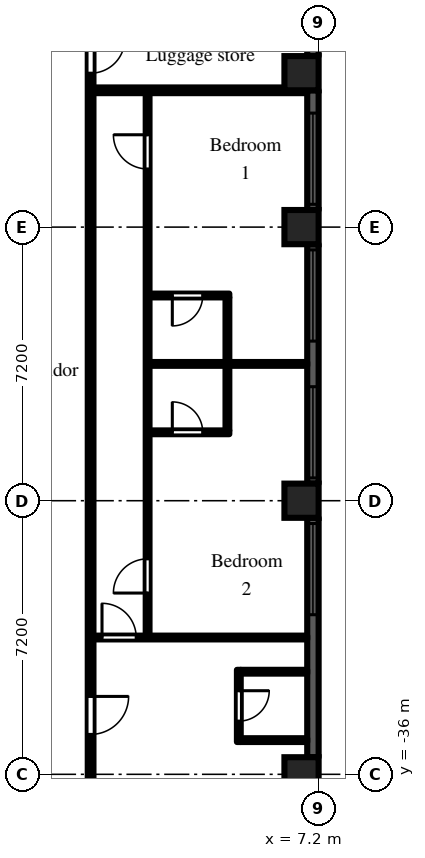
"""IFC4 building model, lengths in metres.
Left out: names, types, materials, properties, quantities, classifications, styles, units other than length and angle.
Written with IfcOpenShell. Run it as: python <this file> out.ifc"""

import sys

from ifc_helpers import new_model, si_unit, direction, frame, frame_2d, origin, origin_2d, place, context, subcontext, project, spatial, rectangle, extrude, element, fill, save


model = new_model("IFC4")
c1 = context("Model", 3, precision=1e-05, world=origin(), true_north=direction((0.0, 1.0)))
c2 = subcontext(c1, "Body", "Model", "MODEL_VIEW")
j1 = project(units=[si_unit("LENGTHUNIT", "METRE"), si_unit("PLANEANGLEUNIT", "RADIAN")], contexts=[c1])
p1 = place(None, origin())
s1 = spatial("IfcSite", under=j1, at=p1, CompositionType="ELEMENT")
p2 = place(p1, origin())
s2 = spatial("IfcBuilding", under=s1, at=p2, CompositionType="ELEMENT")
p3 = place(p2, frame((0.0, 0.0, 108.9)))
s3 = spatial("IfcBuildingStorey", under=s2, at=p3, CompositionType="ELEMENT", Elevation=108.9)
for number, where, z_axis, x_axis in (
    (1, (6.75, -36.0, 0.0), (0.0, 0.0, 1.0), (1.0, 0.0, 0.0)),
    (2, (6.75, -28.8, 0.0), (0.0, 0.0, 1.0), (1.0, 0.0, 0.0)),
    (3, (6.75, -21.6, 0.0), (0.0, 0.0, 1.0), (1.0, 0.0, 0.0)),
    (4, (6.75, -17.55, 0.0), (0.0, 0.0, 1.0), (1.0, 0.0, 0.0)),
):
    element("IfcColumn", number, at=place(p3, frame(where, z_axis=z_axis, x_axis=x_axis)), inside=s3, PredefinedType="COLUMN", context=c2, shape_type="SweptSolid", body=[
        extrude(rectangle(XDim=0.9, YDim=0.9, at=origin_2d()), origin(), (0.0, 0.0, 1.0), 3.0),
    ])
p4 = place(p3, frame((7.05, -35.55, 0.0), z_axis=(0.0, 0.0, 1.0), x_axis=(0.0, 1.0, 0.0)))
e5 = element("IfcWall", 5, at=p4, inside=s3, PredefinedType="SOLIDWALL", context=c2, shape_type="SweptSolid", body=[
    extrude(rectangle(XDim=6.3, YDim=0.3, at=frame_2d((3.15, 0.0))), origin(), (0.0, 0.0, 1.0), 2.2),
])
p5 = place(p4, frame((3.75, 0.0, 0.2)))
e6 = element("IfcOpeningElement", 6, at=p5, cuts=e5, PredefinedType="OPENING", context=c2, shape_type="SweptSolid", body=[
    extrude(rectangle(XDim=2.4, YDim=1.85, at=frame_2d((1.2, 0.925))), frame((0.0, 0.16, 0.0), z_axis=(0.0, -1.0, 0.0), x_axis=(1.0, 0.0, 0.0)), (0.0, 0.0, 1.0), 0.32),
])
p6 = place(p3, frame((7.05, -28.35, 0.0), z_axis=(0.0, 0.0, 1.0), x_axis=(0.0, 1.0, 0.0)))
e7 = element("IfcWall", 7, at=p6, inside=s3, PredefinedType="SOLIDWALL", context=c2, shape_type="SweptSolid", body=[
    extrude(rectangle(XDim=6.3, YDim=0.3, at=frame_2d((3.15, 0.0))), origin(), (0.0, 0.0, 1.0), 2.2),
])
p7 = place(p6, frame((0.15, 0.0, 0.2)))
e8 = element("IfcOpeningElement", 8, at=p7, cuts=e7, PredefinedType="OPENING", context=c2, shape_type="SweptSolid", body=[
    extrude(rectangle(XDim=2.4, YDim=1.85, at=frame_2d((1.2, 0.925))), frame((0.0, 0.16, 0.0), z_axis=(0.0, -1.0, 0.0), x_axis=(1.0, 0.0, 0.0)), (0.0, 0.0, 1.0), 0.32),
])
p8 = place(p6, frame((3.75, 0.0, 0.2)))
e9 = element("IfcOpeningElement", 9, at=p8, cuts=e7, PredefinedType="OPENING", context=c2, shape_type="SweptSolid", body=[
    extrude(rectangle(XDim=2.4, YDim=1.85, at=frame_2d((1.2, 0.925))), frame((0.0, 0.16, 0.0), z_axis=(0.0, -1.0, 0.0), x_axis=(1.0, 0.0, 0.0)), (0.0, 0.0, 1.0), 0.32),
])
p9 = place(p3, frame((7.05, -21.15, 0.0), z_axis=(0.0, 0.0, 1.0), x_axis=(0.0, 1.0, 0.0)))
e10 = element("IfcWall", 10, at=p9, inside=s3, PredefinedType="SOLIDWALL", context=c2, shape_type="SweptSolid", body=[
    extrude(rectangle(XDim=3.15, YDim=0.3, at=frame_2d((1.575, 0.0))), origin(), (0.0, 0.0, 1.0), 2.2),
])
p10 = place(p9, frame((0.15, 0.0, 0.2)))
e11 = element("IfcOpeningElement", 11, at=p10, cuts=e10, PredefinedType="OPENING", context=c2, shape_type="SweptSolid", body=[
    extrude(rectangle(XDim=2.4, YDim=1.85, at=frame_2d((1.2, 0.925))), frame((0.0, 0.16, 0.0), z_axis=(0.0, -1.0, 0.0), x_axis=(1.0, 0.0, 0.0)), (0.0, 0.0, 1.0), 0.32),
])
p11 = place(p3, frame((7.05, -17.1, 0.0), z_axis=(0.0, 0.0, 1.0), x_axis=(0.0, 1.0, 0.0)))
e12 = element("IfcWall", 12, at=p11, inside=s3, PredefinedType="SOLIDWALL", context=c2, shape_type="SweptSolid", body=[
    extrude(rectangle(XDim=1.8, YDim=0.3, at=frame_2d((0.9, 0.0))), origin(), (0.0, 0.0, 1.0), 2.2),
])
p12 = place(p3, frame((1.2, -36.5, 0.0), z_axis=(0.0, 0.0, 1.0), x_axis=(0.0, 1.0, 0.0)))
e13 = element("IfcWall", 13, at=p12, inside=s3, PredefinedType="PARTITIONING", context=c2, shape_type="SweptSolid", body=[
    extrude(rectangle(XDim=35.375, YDim=0.15, at=frame_2d((17.688, 0.0))), origin(), (0.0, 0.0, 1.0), 2.55),
])
p13 = place(p12, frame((33.65, 0.0, 0.0)))
e14 = element("IfcOpeningElement", 14, at=p13, cuts=e13, PredefinedType="OPENING", context=c2, shape_type="SweptSolid", body=[
    extrude(rectangle(XDim=0.9, YDim=2.1, at=frame_2d((0.45, 1.05))), frame((0.0, 0.085, 0.0), z_axis=(0.0, -1.0, 0.0), x_axis=(1.0, 0.0, 0.0)), (0.0, 0.0, 1.0), 0.17),
])
p14 = place(p12, frame((30.65, 0.0, 0.0)))
e15 = element("IfcOpeningElement", 15, at=p14, cuts=e13, PredefinedType="OPENING", context=c2, shape_type="SweptSolid", body=[
    extrude(rectangle(XDim=0.9, YDim=2.1, at=frame_2d((0.45, 1.05))), frame((0.0, 0.085, 0.0), z_axis=(0.0, -1.0, 0.0), x_axis=(1.0, 0.0, 0.0)), (0.0, 0.0, 1.0), 0.17),
])
p15 = place(p12, frame((23.45, 0.0, 0.0)))
e16 = element("IfcOpeningElement", 16, at=p15, cuts=e13, PredefinedType="OPENING", context=c2, shape_type="SweptSolid", body=[
    extrude(rectangle(XDim=0.9, YDim=2.1, at=frame_2d((0.45, 1.05))), frame((0.0, 0.085, 0.0), z_axis=(0.0, -1.0, 0.0), x_axis=(1.0, 0.0, 0.0)), (0.0, 0.0, 1.0), 0.17),
])
p16 = place(p12, frame((20.75, 0.0, 0.0)))
e17 = element("IfcOpeningElement", 17, at=p16, cuts=e13, PredefinedType="OPENING", context=c2, shape_type="SweptSolid", body=[
    extrude(rectangle(XDim=0.9, YDim=2.1, at=frame_2d((0.45, 1.05))), frame((0.0, 0.085, 0.0), z_axis=(0.0, -1.0, 0.0), x_axis=(1.0, 0.0, 0.0)), (0.0, 0.0, 1.0), 0.17),
])
p17 = place(p12, frame((18.95, 0.0, 0.0)))
e18 = element("IfcOpeningElement", 18, at=p17, cuts=e13, PredefinedType="OPENING", context=c2, shape_type="SweptSolid", body=[
    extrude(rectangle(XDim=0.9, YDim=2.1, at=frame_2d((0.45, 1.05))), frame((0.0, 0.085, 0.0), z_axis=(0.0, -1.0, 0.0), x_axis=(1.0, 0.0, 0.0)), (0.0, 0.0, 1.0), 0.17),
])
p18 = place(p12, frame((1.55, 0.0, 0.0)))
e19 = element("IfcOpeningElement", 19, at=p18, cuts=e13, PredefinedType="OPENING", context=c2, shape_type="SweptSolid", body=[
    extrude(rectangle(XDim=1.0, YDim=2.1, at=frame_2d((0.5, 1.05))), frame((0.0, 0.085, 0.0), z_axis=(0.0, -1.0, 0.0), x_axis=(1.0, 0.0, 0.0)), (0.0, 0.0, 1.0), 0.17),
])
p19 = place(p3, frame((1.275, -32.4, 0.0), z_axis=(0.0, 0.0, 1.0), x_axis=(1.0, 0.0, 0.0)))
e20 = element("IfcWall", 20, at=p19, inside=s3, PredefinedType="PARTITIONING", context=c2, shape_type="SweptSolid", body=[
    extrude(rectangle(XDim=5.625, YDim=0.1, at=frame_2d((2.812, 0.0))), origin(), (0.0, 0.0, 1.0), 2.55),
])
p20 = place(p19, frame((0.225, 0.0, 0.0)))
e21 = element("IfcOpeningElement", 21, at=p20, cuts=e20, PredefinedType="OPENING", context=c2, shape_type="SweptSolid", body=[
    extrude(rectangle(XDim=0.9, YDim=2.1, at=frame_2d((0.45, 1.05))), frame((0.0, 0.06, 0.0), z_axis=(0.0, -1.0, 0.0), x_axis=(1.0, 0.0, 0.0)), (0.0, 0.0, 1.0), 0.12),
])
p21 = place(p3, frame((1.275, -18.0, 0.0), z_axis=(0.0, 0.0, 1.0), x_axis=(1.0, 0.0, 0.0)))
e22 = element("IfcWall", 22, at=p21, inside=s3, PredefinedType="PARTITIONING", context=c2, shape_type="SweptSolid", body=[
    extrude(rectangle(XDim=5.625, YDim=0.15, at=frame_2d((2.812, 0.0))), origin(), (0.0, 0.0, 1.0), 2.55),
])
p22 = place(p3, frame((2.7, -32.35, 0.0), z_axis=(0.0, 0.0, 1.0), x_axis=(0.0, 1.0, 0.0)))
e23 = element("IfcWall", 23, at=p22, inside=s3, PredefinedType="PARTITIONING", context=c2, shape_type="SweptSolid", body=[
    extrude(rectangle(XDim=14.275, YDim=0.1, at=frame_2d((7.138, 0.0))), origin(), (0.0, 0.0, 1.0), 2.55),
])
p23 = place(p22, frame((1.12, 0.0, 0.0)))
e24 = element("IfcOpeningElement", 24, at=p23, cuts=e23, PredefinedType="OPENING", context=c2, shape_type="SweptSolid", body=[
    extrude(rectangle(XDim=0.9, YDim=2.1, at=frame_2d((0.45, 1.05))), frame((0.0, 0.06, 0.0), z_axis=(0.0, -1.0, 0.0), x_axis=(1.0, 0.0, 0.0)), (0.0, 0.0, 1.0), 0.12),
])
p24 = place(p22, frame((12.28, 0.0, 0.0)))
e25 = element("IfcOpeningElement", 25, at=p24, cuts=e23, PredefinedType="OPENING", context=c2, shape_type="SweptSolid", body=[
    extrude(rectangle(XDim=0.9, YDim=2.1, at=frame_2d((0.45, 1.05))), frame((0.0, 0.06, 0.0), z_axis=(0.0, -1.0, 0.0), x_axis=(1.0, 0.0, 0.0)), (0.0, 0.0, 1.0), 0.12),
])
p25 = place(p3, frame((2.75, -27.0, 0.0), z_axis=(0.0, 0.0, 1.0), x_axis=(1.0, 0.0, 0.0)))
e26 = element("IfcWall", 26, at=p25, inside=s3, PredefinedType="PARTITIONING", context=c2, shape_type="SweptSolid", body=[
    extrude(rectangle(XDim=2.1, YDim=0.1, at=frame_2d((1.05, 0.0))), origin(), (0.0, 0.0, 1.0), 2.55),
])
p26 = place(p25, frame((0.6, 0.0, 0.0)))
e27 = element("IfcOpeningElement", 27, at=p26, cuts=e26, PredefinedType="OPENING", context=c2, shape_type="SweptSolid", body=[
    extrude(rectangle(XDim=0.8, YDim=2.1, at=frame_2d((0.4, 1.05))), frame((0.0, 0.06, 0.0), z_axis=(0.0, -1.0, 0.0), x_axis=(1.0, 0.0, 0.0)), (0.0, 0.0, 1.0), 0.12),
])
p27 = place(p3, frame((2.75, -25.2, 0.0), z_axis=(0.0, 0.0, 1.0), x_axis=(1.0, 0.0, 0.0)))
e28 = element("IfcWall", 28, at=p27, inside=s3, PredefinedType="PARTITIONING", context=c2, shape_type="SweptSolid", body=[
    extrude(rectangle(XDim=4.15, YDim=0.1, at=frame_2d((2.075, 0.0))), origin(), (0.0, 0.0, 1.0), 2.55),
])
p28 = place(p3, frame((2.75, -23.4, 0.0), z_axis=(0.0, 0.0, 1.0), x_axis=(1.0, 0.0, 0.0)))
e29 = element("IfcWall", 29, at=p28, inside=s3, PredefinedType="PARTITIONING", context=c2, shape_type="SweptSolid", body=[
    extrude(rectangle(XDim=2.1, YDim=0.1, at=frame_2d((1.05, 0.0))), origin(), (0.0, 0.0, 1.0), 2.55),
])
p29 = place(p28, frame((0.6, 0.0, 0.0)))
e30 = element("IfcOpeningElement", 30, at=p29, cuts=e29, PredefinedType="OPENING", context=c2, shape_type="SweptSolid", body=[
    extrude(rectangle(XDim=0.8, YDim=2.1, at=frame_2d((0.4, 1.05))), frame((0.0, 0.06, 0.0), z_axis=(0.0, -1.0, 0.0), x_axis=(1.0, 0.0, 0.0)), (0.0, 0.0, 1.0), 0.12),
])
p30 = place(p3, frame((4.8, -26.95, 0.0), z_axis=(0.0, 0.0, 1.0), x_axis=(0.0, 1.0, 0.0)))
e31 = element("IfcWall", 31, at=p30, inside=s3, PredefinedType="PARTITIONING", context=c2, shape_type="SweptSolid", body=[
    extrude(rectangle(XDim=3.5, YDim=0.1, at=frame_2d((1.75, 0.0))), origin(), (0.0, 0.0, 1.0), 2.55),
])
p31 = place(p3, frame((5.1, -35.15, 0.0), z_axis=(0.0, 0.0, 1.0), x_axis=(0.0, 1.0, 0.0)))
e32 = element("IfcWall", 32, at=p31, inside=s3, PredefinedType="PARTITIONING", context=c2, shape_type="SweptSolid", body=[
    extrude(rectangle(XDim=1.9, YDim=0.1, at=frame_2d((0.95, 0.0))), origin(), (0.0, 0.0, 1.0), 2.55),
])
p32 = place(p31, frame((0.55, 0.0, 0.0)))
e33 = element("IfcOpeningElement", 33, at=p32, cuts=e32, PredefinedType="OPENING", context=c2, shape_type="SweptSolid", body=[
    extrude(rectangle(XDim=0.8, YDim=2.1, at=frame_2d((0.4, 1.05))), frame((0.0, 0.06, 0.0), z_axis=(0.0, -1.0, 0.0), x_axis=(1.0, 0.0, 0.0)), (0.0, 0.0, 1.0), 0.12),
])
for number, where, z_axis, x_axis in (
    (34, (5.15, -35.1, 0.0), (0.0, 0.0, 1.0), (1.0, 0.0, 0.0)),
    (35, (5.15, -33.3, 0.0), (0.0, 0.0, 1.0), (1.0, 0.0, 0.0)),
):
    element("IfcWall", number, at=place(p3, frame(where, z_axis=z_axis, x_axis=x_axis)), inside=s3, PredefinedType="PARTITIONING", context=c2, shape_type="SweptSolid", body=[
        extrude(rectangle(XDim=1.75, YDim=0.1, at=frame_2d((0.875, 0.0))), origin(), (0.0, 0.0, 1.0), 2.55),
    ])
p33 = place(p5, origin())
e36 = element("IfcWindow", 36, at=p33, inside=s3, PartitioningType="SINGLE_PANEL", PredefinedType="WINDOW", context=c2, shape_type="SweptSolid", body=[
    extrude(rectangle(XDim=2.4, YDim=1.85, at=frame_2d((1.2, 0.925))), frame((0.0, 0.03, 0.0), z_axis=(0.0, -1.0, 0.0), x_axis=(1.0, 0.0, 0.0)), (0.0, 0.0, 1.0), 0.06),
])
fill(e6, e36)
p34 = place(p7, origin())
e37 = element("IfcWindow", 37, at=p34, inside=s3, PartitioningType="SINGLE_PANEL", PredefinedType="WINDOW", context=c2, shape_type="SweptSolid", body=[
    extrude(rectangle(XDim=2.4, YDim=1.85, at=frame_2d((1.2, 0.925))), frame((0.0, 0.03, 0.0), z_axis=(0.0, -1.0, 0.0), x_axis=(1.0, 0.0, 0.0)), (0.0, 0.0, 1.0), 0.06),
])
fill(e8, e37)
p35 = place(p8, origin())
e38 = element("IfcWindow", 38, at=p35, inside=s3, PartitioningType="SINGLE_PANEL", PredefinedType="WINDOW", context=c2, shape_type="SweptSolid", body=[
    extrude(rectangle(XDim=2.4, YDim=1.85, at=frame_2d((1.2, 0.925))), frame((0.0, 0.03, 0.0), z_axis=(0.0, -1.0, 0.0), x_axis=(1.0, 0.0, 0.0)), (0.0, 0.0, 1.0), 0.06),
])
fill(e9, e38)
p36 = place(p10, origin())
e39 = element("IfcWindow", 39, at=p36, inside=s3, PartitioningType="SINGLE_PANEL", PredefinedType="WINDOW", context=c2, shape_type="SweptSolid", body=[
    extrude(rectangle(XDim=2.4, YDim=1.85, at=frame_2d((1.2, 0.925))), frame((0.0, 0.03, 0.0), z_axis=(0.0, -1.0, 0.0), x_axis=(1.0, 0.0, 0.0)), (0.0, 0.0, 1.0), 0.06),
])
fill(e11, e39)
p37 = place(p17, frame((0.9, 0.0, 0.0), z_axis=(0.0, 0.0, 1.0), x_axis=(-1.0, 0.0, 0.0)))
e40 = element("IfcDoor", 40, at=p37, inside=s3, OperationType="SINGLE_SWING_LEFT", PredefinedType="DOOR", context=c2, shape_type="SweptSolid", body=[
    extrude(rectangle(XDim=0.9, YDim=2.1, at=frame_2d((0.45, 1.05))), frame((0.0, 0.025, 0.0), z_axis=(0.0, -1.0, 0.0), x_axis=(1.0, 0.0, 0.0)), (0.0, 0.0, 1.0), 0.05),
])
fill(e18, e40)
p38 = place(p32, frame((0.8, 0.0, 0.0), z_axis=(0.0, 0.0, 1.0), x_axis=(-1.0, 0.0, 0.0)))
e41 = element("IfcDoor", 41, at=p38, inside=s3, OperationType="SINGLE_SWING_LEFT", PredefinedType="DOOR", context=c2, shape_type="SweptSolid", body=[
    extrude(rectangle(XDim=0.8, YDim=2.1, at=frame_2d((0.4, 1.05))), frame((0.0, 0.025, 0.0), z_axis=(0.0, -1.0, 0.0), x_axis=(1.0, 0.0, 0.0)), (0.0, 0.0, 1.0), 0.05),
])
fill(e33, e41)
p39 = place(p18, frame((1.0, 0.0, 0.0), z_axis=(0.0, 0.0, 1.0), x_axis=(-1.0, 0.0, 0.0)))
e42 = element("IfcDoor", 42, at=p39, inside=s3, OperationType="SINGLE_SWING_LEFT", PredefinedType="DOOR", context=c2, shape_type="SweptSolid", body=[
    extrude(rectangle(XDim=1.0, YDim=2.1, at=frame_2d((0.5, 1.05))), frame((0.0, 0.025, 0.0), z_axis=(0.0, -1.0, 0.0), x_axis=(1.0, 0.0, 0.0)), (0.0, 0.0, 1.0), 0.05),
])
fill(e19, e42)
p40 = place(p20, origin())
e43 = element("IfcDoor", 43, at=p40, inside=s3, OperationType="SINGLE_SWING_LEFT", PredefinedType="DOOR", context=c2, shape_type="SweptSolid", body=[
    extrude(rectangle(XDim=0.9, YDim=2.1, at=frame_2d((0.45, 1.05))), frame((0.0, 0.025, 0.0), z_axis=(0.0, -1.0, 0.0), x_axis=(1.0, 0.0, 0.0)), (0.0, 0.0, 1.0), 0.05),
])
fill(e21, e43)
p41 = place(p23, origin())
e44 = element("IfcDoor", 44, at=p41, inside=s3, OperationType="SINGLE_SWING_LEFT", PredefinedType="DOOR", context=c2, shape_type="SweptSolid", body=[
    extrude(rectangle(XDim=0.9, YDim=2.1, at=frame_2d((0.45, 1.05))), frame((0.0, 0.025, 0.0), z_axis=(0.0, -1.0, 0.0), x_axis=(1.0, 0.0, 0.0)), (0.0, 0.0, 1.0), 0.05),
])
fill(e24, e44)
p42 = place(p24, origin())
e45 = element("IfcDoor", 45, at=p42, inside=s3, OperationType="SINGLE_SWING_RIGHT", PredefinedType="DOOR", context=c2, shape_type="SweptSolid", body=[
    extrude(rectangle(XDim=0.9, YDim=2.1, at=frame_2d((0.45, 1.05))), frame((0.0, 0.025, 0.0), z_axis=(0.0, -1.0, 0.0), x_axis=(1.0, 0.0, 0.0)), (0.0, 0.0, 1.0), 0.05),
])
fill(e25, e45)
p43 = place(p29, frame((0.8, 0.0, 0.0), z_axis=(0.0, 0.0, 1.0), x_axis=(-1.0, 0.0, 0.0)))
e46 = element("IfcDoor", 46, at=p43, inside=s3, OperationType="SINGLE_SWING_RIGHT", PredefinedType="DOOR", context=c2, shape_type="SweptSolid", body=[
    extrude(rectangle(XDim=0.8, YDim=2.1, at=frame_2d((0.4, 1.05))), frame((0.0, 0.025, 0.0), z_axis=(0.0, -1.0, 0.0), x_axis=(1.0, 0.0, 0.0)), (0.0, 0.0, 1.0), 0.05),
])
fill(e30, e46)
p44 = place(p26, origin())
e47 = element("IfcDoor", 47, at=p44, inside=s3, OperationType="SINGLE_SWING_LEFT", PredefinedType="DOOR", context=c2, shape_type="SweptSolid", body=[
    extrude(rectangle(XDim=0.8, YDim=2.1, at=frame_2d((0.4, 1.05))), frame((0.0, 0.025, 0.0), z_axis=(0.0, -1.0, 0.0), x_axis=(1.0, 0.0, 0.0)), (0.0, 0.0, 1.0), 0.05),
])
fill(e27, e47)
save(model, sys.argv[1])
